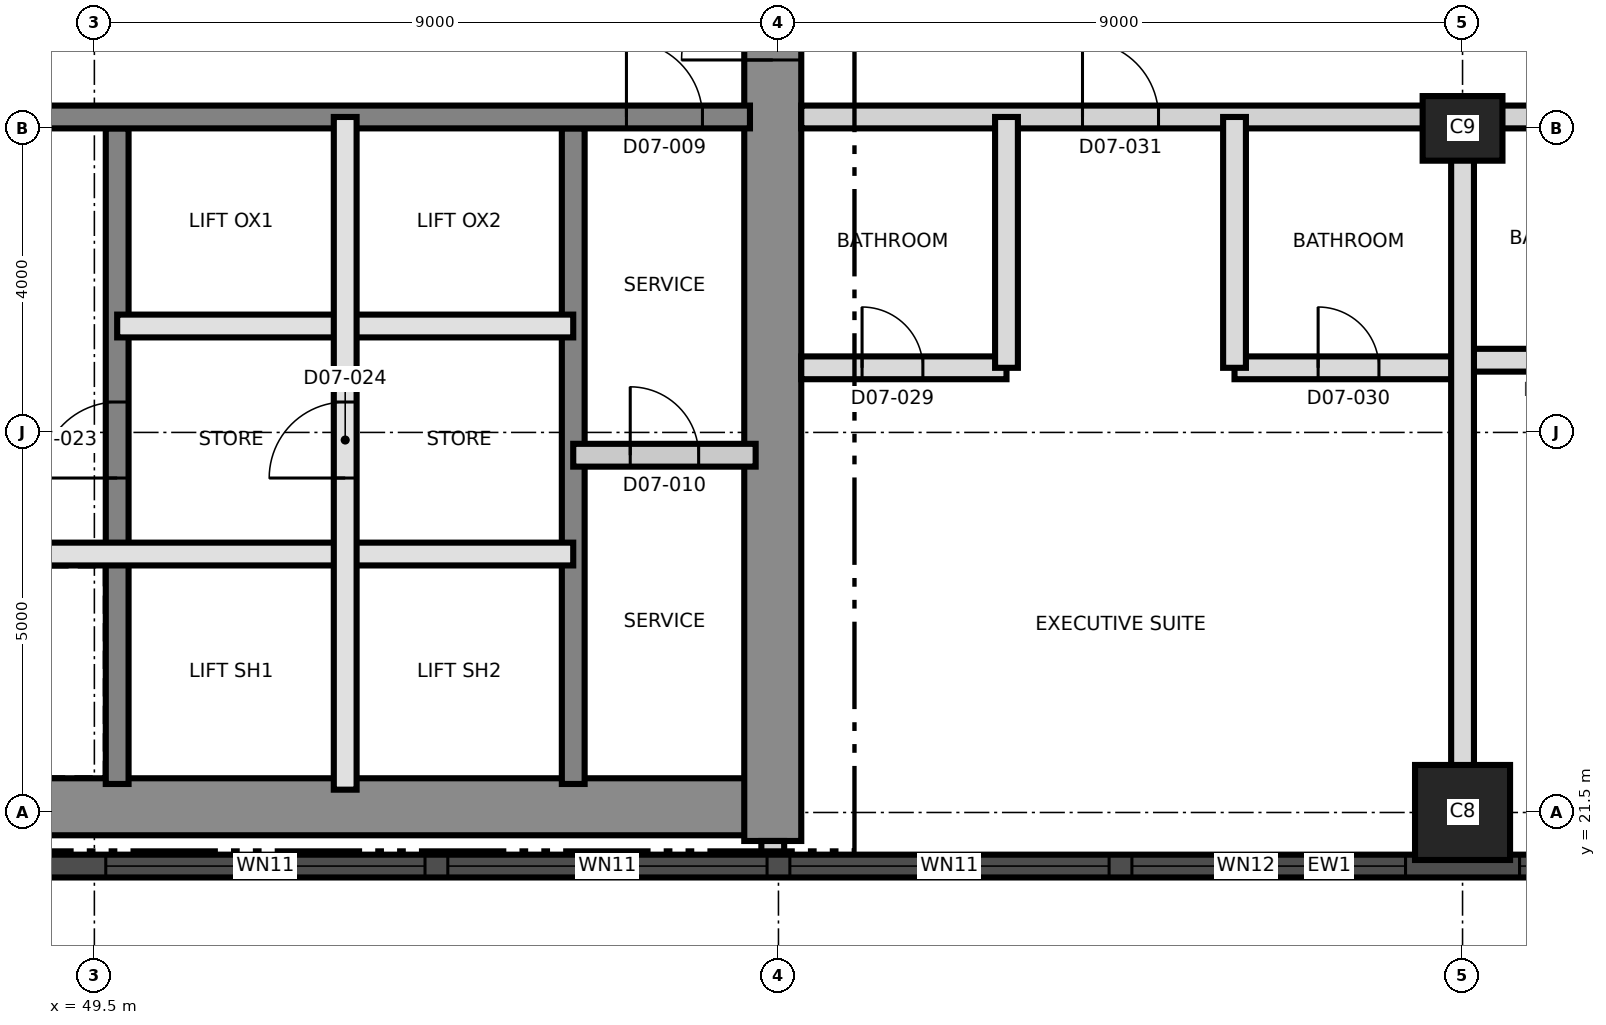
"""IFC4 building model, lengths in metres.
Left out: names, types, materials, properties, quantities, classifications, styles, units other than length and angle.
Written with IfcOpenShell. Run it as: python <this file> out.ifc"""

import sys

from ifc_helpers import new_model, si_unit, direction, frame, frame_2d, origin, origin_2d, place, context, subcontext, project, spatial, rectangle, extrude, element, fill, save


model = new_model("IFC4")
c1 = context("Model", 3, precision=1e-05, world=origin(), true_north=direction((0.0, 1.0)))
c2 = subcontext(c1, "Body", "Model", "MODEL_VIEW")
j1 = project(units=[si_unit("LENGTHUNIT", "METRE"), si_unit("PLANEANGLEUNIT", "RADIAN")], contexts=[c1])
p1 = place(None, origin())
s1 = spatial("IfcSite", under=j1, at=p1, CompositionType="ELEMENT")
p2 = place(p1, origin())
s2 = spatial("IfcBuilding", under=s1, at=p2, CompositionType="ELEMENT")
p3 = place(p2, frame((0.0, 0.0, 94.5)))
s3 = spatial("IfcBuildingStorey", under=s2, at=p3, CompositionType="ELEMENT", Elevation=94.5)
p4 = place(p3, frame((31.125, 21.575, 0.0), z_axis=(0.0, 0.0, 1.0), x_axis=(1.0, 0.0, 0.0)))
e1 = element("IfcWall", 1, at=p4, inside=s3, PredefinedType="SHEAR", context=c2, shape_type="SweptSolid", body=[
    extrude(rectangle(XDim=27.0, YDim=0.75, at=frame_2d((13.5, 0.0))), origin(), (0.0, 0.0, 1.0), 3.7),
])
p5 = place(p3, frame((58.425, 21.125, 0.0), z_axis=(0.0, 0.0, 1.0), x_axis=(0.0, 1.0, 0.0)))
e2 = element("IfcWall", 2, at=p5, inside=s3, PredefinedType="SHEAR", context=c2, shape_type="SweptSolid", body=[
    extrude(rectangle(XDim=18.75, YDim=0.75, at=frame_2d((9.375, 0.0))), origin(), (0.0, 0.0, 1.0), 3.7),
])
p6 = place(p5, frame((10.275, 0.0, 0.0)))
e3 = element("IfcOpeningElement", 3, at=p6, cuts=e2, PredefinedType="OPENING", context=c2, shape_type="SweptSolid", body=[
    extrude(rectangle(XDim=1.2, YDim=2.1, at=frame_2d((0.6, 1.05))), frame((0.0, 0.385, 0.0), z_axis=(0.0, -1.0, 0.0), x_axis=(1.0, 0.0, 0.0)), (0.0, 0.0, 1.0), 0.77),
])
p7 = place(p3, frame((49.8, 21.875, 0.0), z_axis=(0.0, 0.0, 1.0), x_axis=(0.0, 1.0, 0.0)))
e4 = element("IfcWall", 4, at=p7, inside=s3, PredefinedType="SHEAR", context=c2, shape_type="SweptSolid", body=[
    extrude(rectangle(XDim=8.625, YDim=0.3, at=frame_2d((4.312, 0.0))), origin(), (0.0, 0.0, 1.0), 3.7),
])
p8 = place(p7, frame((4.025, 0.0, 0.0)))
e5 = element("IfcOpeningElement", 5, at=p8, cuts=e4, PredefinedType="OPENING", context=c2, shape_type="SweptSolid", body=[
    extrude(rectangle(XDim=1.0, YDim=2.1, at=frame_2d((0.5, 1.05))), frame((0.0, 0.16, 0.0), z_axis=(0.0, -1.0, 0.0), x_axis=(1.0, 0.0, 0.0)), (0.0, 0.0, 1.0), 0.32),
])
p9 = place(p3, frame((55.8, 21.875, 0.0), z_axis=(0.0, 0.0, 1.0), x_axis=(0.0, 1.0, 0.0)))
e6 = element("IfcWall", 6, at=p9, inside=s3, PredefinedType="SHEAR", context=c2, shape_type="SweptSolid", body=[
    extrude(rectangle(XDim=8.625, YDim=0.3, at=frame_2d((4.312, 0.0))), origin(), (0.0, 0.0, 1.0), 3.7),
])
p10 = place(p3, frame((31.875, 30.65, 0.0), z_axis=(0.0, 0.0, 1.0), x_axis=(1.0, 0.0, 0.0)))
e7 = element("IfcWall", 7, at=p10, inside=s3, PredefinedType="SHEAR", context=c2, shape_type="SweptSolid", body=[
    extrude(rectangle(XDim=26.25, YDim=0.3, at=frame_2d((13.125, 0.0))), origin(), (0.0, 0.0, 1.0), 3.7),
])
p11 = place(p10, frame((24.625, 0.0, 0.0)))
e8 = element("IfcOpeningElement", 8, at=p11, cuts=e7, PredefinedType="OPENING", context=c2, shape_type="SweptSolid", body=[
    extrude(rectangle(XDim=1.0, YDim=2.1, at=frame_2d((0.5, 1.05))), frame((0.0, 0.16, 0.0), z_axis=(0.0, -1.0, 0.0), x_axis=(1.0, 0.0, 0.0)), (0.0, 0.0, 1.0), 0.32),
])
p12 = place(p10, frame((11.425, 0.0, 0.0)))
e9 = element("IfcOpeningElement", 9, at=p12, cuts=e7, PredefinedType="OPENING", context=c2, shape_type="SweptSolid", body=[
    extrude(rectangle(XDim=1.0, YDim=2.1, at=frame_2d((0.5, 1.05))), frame((0.0, 0.16, 0.0), z_axis=(0.0, -1.0, 0.0), x_axis=(1.0, 0.0, 0.0)), (0.0, 0.0, 1.0), 0.32),
])
p13 = place(p3, frame((67.5, 21.5, 0.0), z_axis=(0.0, 0.0, 1.0), x_axis=(1.0, 0.0, 0.0)))
e10 = element("IfcColumn", 10, at=p13, inside=s3, PredefinedType="COLUMN", context=c2, shape_type="SweptSolid", body=[
    extrude(rectangle(XDim=1.25, YDim=1.25, at=origin_2d()), origin(), (0.0, 0.0, 1.0), 3.7),
])
p14 = place(p3, frame((67.5, 30.5, 0.0), z_axis=(0.0, 0.0, 1.0), x_axis=(1.0, 0.0, 0.0)))
e11 = element("IfcColumn", 11, at=p14, inside=s3, PredefinedType="COLUMN", context=c2, shape_type="SweptSolid", body=[
    extrude(rectangle(XDim=1.05, YDim=0.85, at=origin_2d()), origin(), (0.0, 0.0, 1.0), 3.7),
])
p15 = place(p3, frame((44.011, 20.795, 0.0), z_axis=(0.0, 0.0, 1.0), x_axis=(1.0, 0.0, 0.0)))
e12 = element("IfcWall", 12, at=p15, inside=s3, PredefinedType="SOLIDWALL", context=c2, shape_type="SweptSolid", body=[
    extrude(rectangle(XDim=43.476, YDim=0.3, at=frame_2d((21.738, 0.0))), origin(), (0.0, 0.0, 1.0), 3.4),
])
p16 = place(p15, frame((1.845, 0.0, 0.3)))
e13 = element("IfcOpeningElement", 13, at=p16, cuts=e12, PredefinedType="OPENING", context=c2, shape_type="SweptSolid", body=[
    extrude(rectangle(XDim=1.8, YDim=2.4, at=frame_2d((0.9, 1.2))), frame((0.0, 0.16, 0.0), z_axis=(0.0, -1.0, 0.0), x_axis=(1.0, 0.0, 0.0)), (0.0, 0.0, 1.0), 0.32),
])
p17 = place(p15, frame((5.639, 0.0, 0.9)))
e14 = element("IfcOpeningElement", 14, at=p17, cuts=e12, PredefinedType="OPENING", context=c2, shape_type="SweptSolid", body=[
    extrude(rectangle(XDim=4.2, YDim=1.5, at=frame_2d((2.1, 0.75))), frame((0.0, 0.16, 0.0), z_axis=(0.0, -1.0, 0.0), x_axis=(1.0, 0.0, 0.0)), (0.0, 0.0, 1.0), 0.32),
])
p18 = place(p15, frame((10.139, 0.0, 0.9)))
e15 = element("IfcOpeningElement", 15, at=p18, cuts=e12, PredefinedType="OPENING", context=c2, shape_type="SweptSolid", body=[
    extrude(rectangle(XDim=4.2, YDim=1.5, at=frame_2d((2.1, 0.75))), frame((0.0, 0.16, 0.0), z_axis=(0.0, -1.0, 0.0), x_axis=(1.0, 0.0, 0.0)), (0.0, 0.0, 1.0), 0.32),
])
p19 = place(p15, frame((14.639, 0.0, 0.9)))
e16 = element("IfcOpeningElement", 16, at=p19, cuts=e12, PredefinedType="OPENING", context=c2, shape_type="SweptSolid", body=[
    extrude(rectangle(XDim=4.2, YDim=1.5, at=frame_2d((2.1, 0.75))), frame((0.0, 0.16, 0.0), z_axis=(0.0, -1.0, 0.0), x_axis=(1.0, 0.0, 0.0)), (0.0, 0.0, 1.0), 0.32),
])
p20 = place(p15, frame((19.139, 0.0, 0.9)))
e17 = element("IfcOpeningElement", 17, at=p20, cuts=e12, PredefinedType="OPENING", context=c2, shape_type="SweptSolid", body=[
    extrude(rectangle(XDim=3.6, YDim=1.5, at=frame_2d((1.8, 0.75))), frame((0.0, 0.16, 0.0), z_axis=(0.0, -1.0, 0.0), x_axis=(1.0, 0.0, 0.0)), (0.0, 0.0, 1.0), 0.32),
])
p21 = place(p15, frame((24.239, 0.0, 0.9)))
e18 = element("IfcOpeningElement", 18, at=p21, cuts=e12, PredefinedType="OPENING", context=c2, shape_type="SweptSolid", body=[
    extrude(rectangle(XDim=3.6, YDim=1.5, at=frame_2d((1.8, 0.75))), frame((0.0, 0.16, 0.0), z_axis=(0.0, -1.0, 0.0), x_axis=(1.0, 0.0, 0.0)), (0.0, 0.0, 1.0), 0.32),
])
p22 = place(p15, frame((28.139, 0.0, 0.9)))
e19 = element("IfcOpeningElement", 19, at=p22, cuts=e12, PredefinedType="OPENING", context=c2, shape_type="SweptSolid", body=[
    extrude(rectangle(XDim=3.6, YDim=1.5, at=frame_2d((1.8, 0.75))), frame((0.0, 0.16, 0.0), z_axis=(0.0, -1.0, 0.0), x_axis=(1.0, 0.0, 0.0)), (0.0, 0.0, 1.0), 0.32),
])
p23 = place(p15, frame((33.239, 0.0, 0.9)))
e20 = element("IfcOpeningElement", 20, at=p23, cuts=e12, PredefinedType="OPENING", context=c2, shape_type="SweptSolid", body=[
    extrude(rectangle(XDim=3.6, YDim=1.5, at=frame_2d((1.8, 0.75))), frame((0.0, 0.16, 0.0), z_axis=(0.0, -1.0, 0.0), x_axis=(1.0, 0.0, 0.0)), (0.0, 0.0, 1.0), 0.32),
])
p24 = place(p15, frame((37.139, 0.0, 0.9)))
e21 = element("IfcOpeningElement", 21, at=p24, cuts=e12, PredefinedType="OPENING", context=c2, shape_type="SweptSolid", body=[
    extrude(rectangle(XDim=3.6, YDim=1.5, at=frame_2d((1.8, 0.75))), frame((0.0, 0.16, 0.0), z_axis=(0.0, -1.0, 0.0), x_axis=(1.0, 0.0, 0.0)), (0.0, 0.0, 1.0), 0.32),
])
p25 = place(p3, frame((46.8, 24.9, 0.0), z_axis=(0.0, 0.0, 1.0), x_axis=(1.0, 0.0, 0.0)))
e22 = element("IfcWall", 22, at=p25, inside=s3, PredefinedType="SOLIDWALL", context=c2, shape_type="SweptSolid", body=[
    extrude(rectangle(XDim=9.0, YDim=0.3, at=frame_2d((4.5, 0.0))), origin(), (0.0, 0.0, 1.0), 3.4),
])
p26 = place(p25, frame((1.05, 0.0, 0.0)))
e23 = element("IfcOpeningElement", 23, at=p26, cuts=e22, PredefinedType="OPENING", context=c2, shape_type="SweptSolid", body=[
    extrude(rectangle(XDim=0.9, YDim=2.1, at=frame_2d((0.45, 1.05))), frame((0.0, 0.16, 0.0), z_axis=(0.0, -1.0, 0.0), x_axis=(1.0, 0.0, 0.0)), (0.0, 0.0, 1.0), 0.32),
])
p27 = place(p3, frame((55.8, 26.2, 0.0), z_axis=(0.0, 0.0, 1.0), x_axis=(1.0, 0.0, 0.0)))
e24 = element("IfcWall", 24, at=p27, inside=s3, PredefinedType="PARTITIONING", context=c2, shape_type="SweptSolid", body=[
    extrude(rectangle(XDim=2.4, YDim=0.3, at=frame_2d((1.2, 0.0))), origin(), (0.0, 0.0, 1.0), 3.4),
])
p28 = place(p27, frame((0.75, 0.0, 0.0)))
e25 = element("IfcOpeningElement", 25, at=p28, cuts=e24, PredefinedType="OPENING", context=c2, shape_type="SweptSolid", body=[
    extrude(rectangle(XDim=0.9, YDim=2.1, at=frame_2d((0.45, 1.05))), frame((0.0, 0.16, 0.0), z_axis=(0.0, -1.0, 0.0), x_axis=(1.0, 0.0, 0.0)), (0.0, 0.0, 1.0), 0.32),
])
p29 = place(p3, frame((49.8, 27.9, 0.0), z_axis=(0.0, 0.0, 1.0), x_axis=(1.0, 0.0, 0.0)))
e26 = element("IfcWall", 26, at=p29, inside=s3, PredefinedType="SOLIDWALL", context=c2, shape_type="SweptSolid", body=[
    extrude(rectangle(XDim=6.0, YDim=0.3, at=frame_2d((3.0, 0.0))), origin(), (0.0, 0.0, 1.0), 3.4),
])
p30 = place(p3, frame((52.8, 21.8, 0.0), z_axis=(0.0, 0.0, 1.0), x_axis=(0.0, 1.0, 0.0)))
e27 = element("IfcWall", 27, at=p30, inside=s3, PredefinedType="SOLIDWALL", context=c2, shape_type="SweptSolid", body=[
    extrude(rectangle(XDim=8.85, YDim=0.3, at=frame_2d((4.425, 0.0))), origin(), (0.0, 0.0, 1.0), 3.4),
])
p31 = place(p30, frame((4.1, 0.0, 0.0)))
e28 = element("IfcOpeningElement", 28, at=p31, cuts=e27, PredefinedType="OPENING", context=c2, shape_type="SweptSolid", body=[
    extrude(rectangle(XDim=1.0, YDim=2.1, at=frame_2d((0.5, 1.05))), frame((0.0, 0.16, 0.0), z_axis=(0.0, -1.0, 0.0), x_axis=(1.0, 0.0, 0.0)), (0.0, 0.0, 1.0), 0.32),
])
p32 = place(p3, frame((58.8, 27.35, 0.0), z_axis=(0.0, 0.0, 1.0), x_axis=(1.0, 0.0, 0.0)))
e29 = element("IfcWall", 29, at=p32, inside=s3, PredefinedType="PARTITIONING", context=c2, shape_type="SweptSolid", body=[
    extrude(rectangle(XDim=2.7, YDim=0.3, at=frame_2d((1.35, 0.0))), origin(), (0.0, 0.0, 1.0), 3.4),
])
p33 = place(p32, frame((0.8, 0.0, 0.0)))
e30 = element("IfcOpeningElement", 30, at=p33, cuts=e29, PredefinedType="OPENING", context=c2, shape_type="SweptSolid", body=[
    extrude(rectangle(XDim=0.8, YDim=2.1, at=frame_2d((0.4, 1.05))), frame((0.0, 0.16, 0.0), z_axis=(0.0, -1.0, 0.0), x_axis=(1.0, 0.0, 0.0)), (0.0, 0.0, 1.0), 0.32),
])
p34 = place(p3, frame((64.5, 27.35, 0.0), z_axis=(0.0, 0.0, 1.0), x_axis=(1.0, 0.0, 0.0)))
e31 = element("IfcWall", 31, at=p34, inside=s3, PredefinedType="PARTITIONING", context=c2, shape_type="SweptSolid", body=[
    extrude(rectangle(XDim=3.0, YDim=0.3, at=frame_2d((1.5, 0.0))), origin(), (0.0, 0.0, 1.0), 3.4),
])
p35 = place(p34, frame((1.1, 0.0, 0.0)))
e32 = element("IfcOpeningElement", 32, at=p35, cuts=e31, PredefinedType="OPENING", context=c2, shape_type="SweptSolid", body=[
    extrude(rectangle(XDim=0.8, YDim=2.1, at=frame_2d((0.4, 1.05))), frame((0.0, 0.16, 0.0), z_axis=(0.0, -1.0, 0.0), x_axis=(1.0, 0.0, 0.0)), (0.0, 0.0, 1.0), 0.32),
])
p36 = place(p3, frame((67.5, 27.45, 0.0), z_axis=(0.0, 0.0, 1.0), x_axis=(1.0, 0.0, 0.0)))
e33 = element("IfcWall", 33, at=p36, inside=s3, PredefinedType="PARTITIONING", context=c2, shape_type="SweptSolid", body=[
    extrude(rectangle(XDim=2.7, YDim=0.3, at=frame_2d((1.35, 0.0))), origin(), (0.0, 0.0, 1.0), 3.4),
])
p37 = place(p36, frame((0.95, 0.0, 0.0)))
e34 = element("IfcOpeningElement", 34, at=p37, cuts=e33, PredefinedType="OPENING", context=c2, shape_type="SweptSolid", body=[
    extrude(rectangle(XDim=0.8, YDim=2.1, at=frame_2d((0.4, 1.05))), frame((0.0, 0.16, 0.0), z_axis=(0.0, -1.0, 0.0), x_axis=(1.0, 0.0, 0.0)), (0.0, 0.0, 1.0), 0.32),
])
p38 = place(p3, frame((58.8, 30.65, 0.0), z_axis=(0.0, 0.0, 1.0), x_axis=(1.0, 0.0, 0.0)))
e35 = element("IfcWall", 35, at=p38, inside=s3, PredefinedType="PARTITIONING", context=c2, shape_type="SweptSolid", body=[
    extrude(rectangle(XDim=26.53, YDim=0.3, at=frame_2d((13.265, 0.0))), origin(), (0.0, 0.0, 1.0), 3.4),
])
p39 = place(p38, frame((3.7, 0.0, 0.0)))
e36 = element("IfcOpeningElement", 36, at=p39, cuts=e35, PredefinedType="OPENING", context=c2, shape_type="SweptSolid", body=[
    extrude(rectangle(XDim=1.0, YDim=2.4, at=frame_2d((0.5, 1.2))), frame((0.0, 0.16, 0.0), z_axis=(0.0, -1.0, 0.0), x_axis=(1.0, 0.0, 0.0)), (0.0, 0.0, 1.0), 0.32),
])
p40 = place(p38, frame((11.8, 0.0, 0.0)))
e37 = element("IfcOpeningElement", 37, at=p40, cuts=e35, PredefinedType="OPENING", context=c2, shape_type="SweptSolid", body=[
    extrude(rectangle(XDim=1.0, YDim=2.1, at=frame_2d((0.5, 1.05))), frame((0.0, 0.16, 0.0), z_axis=(0.0, -1.0, 0.0), x_axis=(1.0, 0.0, 0.0)), (0.0, 0.0, 1.0), 0.32),
])
p41 = place(p38, frame((13.6, 0.0, 0.0)))
e38 = element("IfcOpeningElement", 38, at=p41, cuts=e35, PredefinedType="OPENING", context=c2, shape_type="SweptSolid", body=[
    extrude(rectangle(XDim=1.0, YDim=2.1, at=frame_2d((0.5, 1.05))), frame((0.0, 0.16, 0.0), z_axis=(0.0, -1.0, 0.0), x_axis=(1.0, 0.0, 0.0)), (0.0, 0.0, 1.0), 0.32),
])
p42 = place(p38, frame((18.85, 0.0, 0.0)))
e39 = element("IfcOpeningElement", 39, at=p42, cuts=e35, PredefinedType="OPENING", context=c2, shape_type="SweptSolid", body=[
    extrude(rectangle(XDim=1.0, YDim=2.1, at=frame_2d((0.5, 1.05))), frame((0.0, 0.16, 0.0), z_axis=(0.0, -1.0, 0.0), x_axis=(1.0, 0.0, 0.0)), (0.0, 0.0, 1.0), 0.32),
])
p43 = place(p38, frame((24.7, 0.0, 0.0)))
e40 = element("IfcOpeningElement", 40, at=p43, cuts=e35, PredefinedType="OPENING", context=c2, shape_type="SweptSolid", body=[
    extrude(rectangle(XDim=1.0, YDim=2.1, at=frame_2d((0.5, 1.05))), frame((0.0, 0.16, 0.0), z_axis=(0.0, -1.0, 0.0), x_axis=(1.0, 0.0, 0.0)), (0.0, 0.0, 1.0), 0.32),
])
for number, where, z_axis, x_axis in (
    (41, (61.5, 27.35, 0.0), (0.0, 0.0, 1.0), (0.0, 1.0, 0.0)),
    (42, (64.5, 27.35, 0.0), (0.0, 0.0, 1.0), (0.0, 1.0, 0.0)),
):
    element("IfcWall", number, at=place(p3, frame(where, z_axis=z_axis, x_axis=x_axis)), inside=s3, PredefinedType="PARTITIONING", context=c2, shape_type="SweptSolid", body=[
        extrude(rectangle(XDim=3.3, YDim=0.3, at=frame_2d((1.65, 0.0))), origin(), (0.0, 0.0, 1.0), 3.4),
    ])
p44 = place(p3, frame((67.5, 20.995, 0.0), z_axis=(0.0, 0.0, 1.0), x_axis=(0.0, 1.0, 0.0)))
e43 = element("IfcWall", 43, at=p44, inside=s3, PredefinedType="PARTITIONING", context=c2, shape_type="SweptSolid", body=[
    extrude(rectangle(XDim=9.655, YDim=0.3, at=frame_2d((4.827, 0.0))), origin(), (0.0, 0.0, 1.0), 3.35),
])
p45 = place(p3, frame((58.425, 21.125, 0.0), z_axis=(0.0, 0.0, 1.0), x_axis=(0.0, -1.0, 0.0)))
e44 = element("IfcWall", 44, at=p45, inside=s3, PredefinedType="PARTITIONING", context=c2, shape_type="SweptSolid", body=[
    extrude(rectangle(XDim=0.17, YDim=0.3, at=frame_2d((0.085, 0.0))), origin(), (0.0, 0.0, 1.0), 3.4),
])
p46 = place(p17, origin())
e45 = element("IfcWindow", 45, at=p46, inside=s3, PartitioningType="SINGLE_PANEL", PredefinedType="WINDOW", context=c2, shape_type="SweptSolid", body=[
    extrude(rectangle(XDim=4.2, YDim=1.5, at=frame_2d((2.1, 0.75))), frame((0.0, 0.03, 0.0), z_axis=(0.0, -1.0, 0.0), x_axis=(1.0, 0.0, 0.0)), (0.0, 0.0, 1.0), 0.06),
])
fill(e14, e45)
p47 = place(p18, origin())
e46 = element("IfcWindow", 46, at=p47, inside=s3, PartitioningType="SINGLE_PANEL", PredefinedType="WINDOW", context=c2, shape_type="SweptSolid", body=[
    extrude(rectangle(XDim=4.2, YDim=1.5, at=frame_2d((2.1, 0.75))), frame((0.0, 0.03, 0.0), z_axis=(0.0, -1.0, 0.0), x_axis=(1.0, 0.0, 0.0)), (0.0, 0.0, 1.0), 0.06),
])
fill(e15, e46)
p48 = place(p19, origin())
e47 = element("IfcWindow", 47, at=p48, inside=s3, PartitioningType="SINGLE_PANEL", PredefinedType="WINDOW", context=c2, shape_type="SweptSolid", body=[
    extrude(rectangle(XDim=4.2, YDim=1.5, at=frame_2d((2.1, 0.75))), frame((0.0, 0.03, 0.0), z_axis=(0.0, -1.0, 0.0), x_axis=(1.0, 0.0, 0.0)), (0.0, 0.0, 1.0), 0.06),
])
fill(e16, e47)
p49 = place(p20, origin())
e48 = element("IfcWindow", 48, at=p49, inside=s3, PartitioningType="SINGLE_PANEL", PredefinedType="WINDOW", context=c2, shape_type="SweptSolid", body=[
    extrude(rectangle(XDim=3.6, YDim=1.5, at=frame_2d((1.8, 0.75))), frame((0.0, 0.03, 0.0), z_axis=(0.0, -1.0, 0.0), x_axis=(1.0, 0.0, 0.0)), (0.0, 0.0, 1.0), 0.06),
])
fill(e17, e48)
p50 = place(p21, origin())
e49 = element("IfcWindow", 49, at=p50, inside=s3, PartitioningType="SINGLE_PANEL", PredefinedType="WINDOW", context=c2, shape_type="SweptSolid", body=[
    extrude(rectangle(XDim=3.6, YDim=1.5, at=frame_2d((1.8, 0.75))), frame((0.0, 0.03, 0.0), z_axis=(0.0, -1.0, 0.0), x_axis=(1.0, 0.0, 0.0)), (0.0, 0.0, 1.0), 0.06),
])
fill(e18, e49)
p51 = place(p11, origin())
e50 = element("IfcDoor", 50, at=p51, inside=s3, OperationType="SINGLE_SWING_LEFT", PredefinedType="DOOR", context=c2, shape_type="SweptSolid", body=[
    extrude(rectangle(XDim=1.0, YDim=2.1, at=frame_2d((0.5, 1.05))), frame((0.0, 0.025, 0.0), z_axis=(0.0, -1.0, 0.0), x_axis=(1.0, 0.0, 0.0)), (0.0, 0.0, 1.0), 0.05),
])
fill(e8, e50)
p52 = place(p28, origin())
e51 = element("IfcDoor", 51, at=p52, inside=s3, OperationType="SINGLE_SWING_RIGHT", PredefinedType="DOOR", context=c2, shape_type="SweptSolid", body=[
    extrude(rectangle(XDim=0.9, YDim=2.1, at=frame_2d((0.45, 1.05))), frame((0.0, 0.025, 0.0), z_axis=(0.0, -1.0, 0.0), x_axis=(1.0, 0.0, 0.0)), (0.0, 0.0, 1.0), 0.05),
])
fill(e25, e51)
p53 = place(p6, origin())
e52 = element("IfcDoor", 52, at=p53, inside=s3, OperationType="SINGLE_SWING_LEFT", PredefinedType="DOOR", context=c2, shape_type="SweptSolid", body=[
    extrude(rectangle(XDim=1.2, YDim=2.1, at=frame_2d((0.6, 1.05))), frame((0.0, 0.025, 0.0), z_axis=(0.0, -1.0, 0.0), x_axis=(1.0, 0.0, 0.0)), (0.0, 0.0, 1.0), 0.05),
])
fill(e3, e52)
p54 = place(p8, origin())
e53 = element("IfcDoor", 53, at=p54, inside=s3, OperationType="SINGLE_SWING_LEFT", PredefinedType="DOOR", context=c2, shape_type="SweptSolid", body=[
    extrude(rectangle(XDim=1.0, YDim=2.1, at=frame_2d((0.5, 1.05))), frame((0.0, 0.025, 0.0), z_axis=(0.0, -1.0, 0.0), x_axis=(1.0, 0.0, 0.0)), (0.0, 0.0, 1.0), 0.05),
])
fill(e5, e53)
p55 = place(p31, origin())
e54 = element("IfcDoor", 54, at=p55, inside=s3, OperationType="SINGLE_SWING_RIGHT", PredefinedType="DOOR", context=c2, shape_type="SweptSolid", body=[
    extrude(rectangle(XDim=1.0, YDim=2.1, at=frame_2d((0.5, 1.05))), frame((0.0, 0.025, 0.0), z_axis=(0.0, -1.0, 0.0), x_axis=(1.0, 0.0, 0.0)), (0.0, 0.0, 1.0), 0.05),
])
fill(e28, e54)
p56 = place(p33, origin())
e55 = element("IfcDoor", 55, at=p56, inside=s3, OperationType="SINGLE_SWING_LEFT", PredefinedType="DOOR", context=c2, shape_type="SweptSolid", body=[
    extrude(rectangle(XDim=0.8, YDim=2.1, at=frame_2d((0.4, 1.05))), frame((0.0, 0.025, 0.0), z_axis=(0.0, -1.0, 0.0), x_axis=(1.0, 0.0, 0.0)), (0.0, 0.0, 1.0), 0.05),
])
fill(e30, e55)
p57 = place(p35, origin())
e56 = element("IfcDoor", 56, at=p57, inside=s3, OperationType="SINGLE_SWING_RIGHT", PredefinedType="DOOR", context=c2, shape_type="SweptSolid", body=[
    extrude(rectangle(XDim=0.8, YDim=2.1, at=frame_2d((0.4, 1.05))), frame((0.0, 0.025, 0.0), z_axis=(0.0, -1.0, 0.0), x_axis=(1.0, 0.0, 0.0)), (0.0, 0.0, 1.0), 0.05),
])
fill(e32, e56)
p58 = place(p39, origin())
e57 = element("IfcDoor", 57, at=p58, inside=s3, OperationType="SINGLE_SWING_LEFT", PredefinedType="DOOR", context=c2, shape_type="SweptSolid", body=[
    extrude(rectangle(XDim=1.0, YDim=2.4, at=frame_2d((0.5, 1.2))), frame((0.0, 0.025, 0.0), z_axis=(0.0, -1.0, 0.0), x_axis=(1.0, 0.0, 0.0)), (0.0, 0.0, 1.0), 0.05),
])
fill(e36, e57)
save(model, sys.argv[1])
